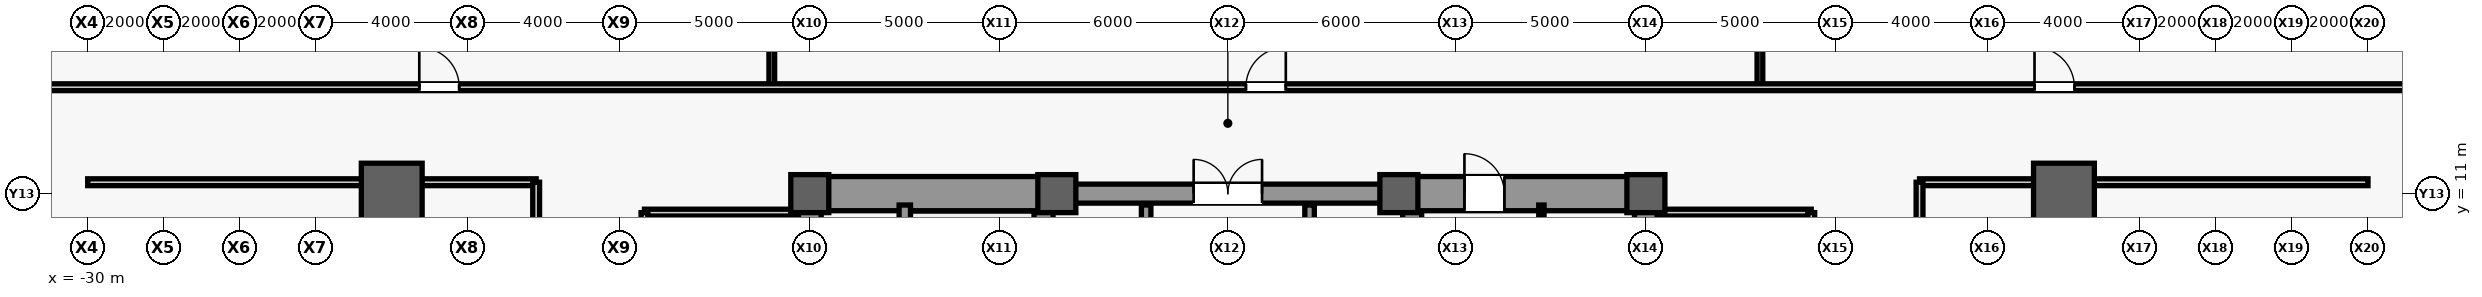
"""IFC4 building model, lengths in metres.
Left out: names, types, materials, properties, quantities, classifications, styles, units other than length and angle.
Written with IfcOpenShell. Run it as: python <this file> out.ifc"""

import sys

from ifc_helpers import new_model, si_unit, direction, frame, frame_2d, origin, origin_2d, place, context, subcontext, project, spatial, rectangle, extrude, source, transform, mapped, element, fill, save


model = new_model("IFC4")
c1 = context("Model", 3, precision=1e-05, world=origin(), true_north=direction((0.0, 1.0)))
c2 = subcontext(c1, "Body", "Model", "MODEL_VIEW")
j1 = project(units=[si_unit("LENGTHUNIT", "METRE"), si_unit("PLANEANGLEUNIT", "RADIAN")], contexts=[c1])
p1 = place(None, origin())
s1 = spatial("IfcSite", under=j1, at=p1, CompositionType="ELEMENT")
p2 = place(p1, origin())
s2 = spatial("IfcBuilding", under=s1, at=p2, CompositionType="ELEMENT")
p3 = place(p2, frame((0.0, 0.0, 6.6)))
s3 = spatial("IfcBuildingStorey", under=s2, at=p3, CompositionType="ELEMENT", Elevation=6.6)
m1 = source(origin(), c2, "Body", "SweptSolid", [
    extrude(rectangle(XDim=22.0, YDim=0.6, at=frame_2d((11.0, 0.0))), origin(), (0.0, 0.0, 1.0), 5.08),
])
p4 = place(p3, frame((-11.0, -11.0, 0.0), z_axis=(0.0, 0.0, 1.0), x_axis=(0.0, 1.0, 0.0)))
e1 = element("IfcWall", 1, at=p4, inside=s3, PredefinedType="SHEAR", context=c2, shape_type="MappedRepresentation", body=[
    mapped(m1, transform((0.0, 0.0, 0.0), scale=1.0)),
])
m2 = source(origin(), c2, "Body", "SweptSolid", [
    extrude(rectangle(XDim=1.1, YDim=2.2, at=frame_2d((0.55, 1.1))), frame((0.0, 0.31, 0.0), z_axis=(0.0, -1.0, 0.0), x_axis=(1.0, 0.0, 0.0)), (0.0, 0.0, 1.0), 0.62),
])
p5 = place(p4, frame((0.8, 0.0, 0.0)))
e2 = element("IfcOpeningElement", 2, at=p5, cuts=e1, PredefinedType="OPENING", context=c2, shape_type="MappedRepresentation", body=[
    mapped(m2, transform((0.0, 0.0, 0.0), scale=1.0)),
])
p6 = place(p4, frame((12.5, 0.0, 0.0)))
e3 = element("IfcOpeningElement", 3, at=p6, cuts=e1, PredefinedType="OPENING", context=c2, shape_type="MappedRepresentation", body=[
    mapped(m2, transform((0.0, 0.0, 0.0), scale=1.0)),
])
m3 = source(origin(), c2, "Body", "SweptSolid", [
    extrude(rectangle(XDim=0.9, YDim=2.15, at=frame_2d((0.45, 1.075))), frame((0.0, 0.31, 0.0), z_axis=(0.0, -1.0, 0.0), x_axis=(1.0, 0.0, 0.0)), (0.0, 0.0, 1.0), 0.62),
])
p7 = place(p4, frame((6.85, 0.0, 0.0)))
e4 = element("IfcOpeningElement", 4, at=p7, cuts=e1, PredefinedType="OPENING", context=c2, shape_type="MappedRepresentation", body=[
    mapped(m3, transform((0.0, 0.0, 0.0), scale=1.0)),
])
m4 = source(origin(), c2, "Body", "SweptSolid", [
    extrude(rectangle(XDim=1.3, YDim=2.3, at=frame_2d((0.65, 1.15))), frame((0.0, 0.31, 0.0), z_axis=(0.0, -1.0, 0.0), x_axis=(1.0, 0.0, 0.0)), (0.0, 0.0, 1.0), 0.62),
])
p8 = place(p4, frame((2.7, 0.0, 0.0)))
e5 = element("IfcOpeningElement", 5, at=p8, cuts=e1, PredefinedType="OPENING", context=c2, shape_type="MappedRepresentation", body=[
    mapped(m4, transform((0.0, 0.0, 0.0), scale=1.0)),
])
p9 = place(p3, frame((11.0, -11.0, 0.0), z_axis=(0.0, 0.0, 1.0), x_axis=(0.0, 1.0, 0.0)))
e6 = element("IfcWall", 6, at=p9, inside=s3, PredefinedType="SHEAR", context=c2, shape_type="MappedRepresentation", body=[
    mapped(m1, transform((0.0, 0.0, 0.0), scale=1.0)),
])
p10 = place(p9, frame((0.8, 0.0, 0.0)))
e7 = element("IfcOpeningElement", 7, at=p10, cuts=e6, PredefinedType="OPENING", context=c2, shape_type="MappedRepresentation", body=[
    mapped(m2, transform((0.0, 0.0, 0.0), scale=1.0)),
])
p11 = place(p9, frame((6.2, 0.0, 0.0)))
e8 = element("IfcOpeningElement", 8, at=p11, cuts=e6, PredefinedType="OPENING", context=c2, shape_type="MappedRepresentation", body=[
    mapped(m3, transform((0.0, 0.0, 0.0), scale=1.0)),
])
p12 = place(p9, frame((8.05, 0.0, 0.0)))
e9 = element("IfcOpeningElement", 9, at=p12, cuts=e6, PredefinedType="OPENING", context=c2, shape_type="MappedRepresentation", body=[
    mapped(m3, transform((0.0, 0.0, 0.0), scale=1.0)),
])
p13 = place(p9, frame((2.7, 0.0, 0.0)))
e10 = element("IfcOpeningElement", 10, at=p13, cuts=e6, PredefinedType="OPENING", context=c2, shape_type="MappedRepresentation", body=[
    mapped(m4, transform((0.0, 0.0, 0.0), scale=1.0)),
])
p14 = place(p9, frame((13.35, 0.0, 0.0)))
e11 = element("IfcOpeningElement", 11, at=p14, cuts=e6, PredefinedType="OPENING", context=c2, shape_type="MappedRepresentation", body=[
    mapped(m4, transform((0.0, 0.0, 0.0), scale=1.0)),
])
m5 = source(origin(), c2, "Body", "SweptSolid", [
    extrude(rectangle(XDim=21.4, YDim=0.5, at=frame_2d((10.7, 0.0))), origin(), (0.0, 0.0, 1.0), 5.08),
])
for number, where, z_axis, x_axis in (
    (12, (-4.85, -10.7, 0.0), (0.0, 0.0, 1.0), (0.0, 1.0, 0.0)),
    (13, (4.85, -10.7, 0.0), (0.0, 0.0, 1.0), (0.0, 1.0, 0.0)),
):
    element("IfcWall", number, at=place(p3, frame(where, z_axis=z_axis, x_axis=x_axis)), inside=s3, PredefinedType="SHEAR", context=c2, shape_type="MappedRepresentation", body=[
        mapped(m5, transform((0.0, 0.0, 0.0), scale=1.0)),
    ])
m6 = source(origin(), c2, "Body", "SweptSolid", [
    extrude(rectangle(XDim=5.85, YDim=0.9, at=frame_2d((2.925, 0.0))), origin(), (0.0, 0.0, 1.0), 5.08),
])
p15 = place(p3, frame((-10.7, 11.0, 0.0), z_axis=(0.0, 0.0, 1.0), x_axis=(1.0, 0.0, 0.0)))
e14 = element("IfcWall", 14, at=p15, inside=s3, PredefinedType="SHEAR", context=c2, shape_type="MappedRepresentation", body=[
    mapped(m6, transform((0.0, 0.0, 0.0), scale=1.0)),
])
p16 = place(p3, frame((4.85, 11.0, 0.0), z_axis=(0.0, 0.0, 1.0), x_axis=(1.0, 0.0, 0.0)))
e15 = element("IfcWall", 15, at=p16, inside=s3, PredefinedType="SHEAR", context=c2, shape_type="MappedRepresentation", body=[
    mapped(m6, transform((0.0, 0.0, 0.0), scale=1.0)),
])
m7 = source(origin(), c2, "Body", "SweptSolid", [
    extrude(rectangle(XDim=1.05, YDim=2.2, at=frame_2d((0.525, 1.1))), frame((0.0, 0.46, 0.0), z_axis=(0.0, -1.0, 0.0), x_axis=(1.0, 0.0, 0.0)), (0.0, 0.0, 1.0), 0.92),
])
p17 = place(p16, frame((1.375, 0.0, 0.0)))
e16 = element("IfcOpeningElement", 16, at=p17, cuts=e15, PredefinedType="OPENING", context=c2, shape_type="MappedRepresentation", body=[
    mapped(m7, transform((0.0, 0.0, 0.0), scale=1.0)),
])
m8 = source(origin(), c2, "Body", "SweptSolid", [
    extrude(rectangle(XDim=9.2, YDim=0.5, at=frame_2d((4.6, 0.0))), origin(), (0.0, 0.0, 1.0), 5.08),
])
p18 = place(p3, frame((-4.6, 11.0, 0.0), z_axis=(0.0, 0.0, 1.0), x_axis=(1.0, 0.0, 0.0)))
e17 = element("IfcWall", 17, at=p18, inside=s3, PredefinedType="SHEAR", context=c2, shape_type="MappedRepresentation", body=[
    mapped(m8, transform((0.0, 0.0, 0.0), scale=1.0)),
])
m9 = source(origin(), c2, "Body", "SweptSolid", [
    extrude(rectangle(XDim=1.8, YDim=2.25, at=frame_2d((0.9, 1.125))), frame((0.0, 0.26, 0.0), z_axis=(0.0, -1.0, 0.0), x_axis=(1.0, 0.0, 0.0)), (0.0, 0.0, 1.0), 0.52),
])
p19 = place(p18, frame((3.7, 0.0, 0.0)))
e18 = element("IfcOpeningElement", 18, at=p19, cuts=e17, PredefinedType="OPENING", context=c2, shape_type="MappedRepresentation", body=[
    mapped(m9, transform((0.0, 0.0, 0.0), scale=1.0)),
])
m10 = source(origin(), c2, "Body", "SweptSolid", [
    extrude(rectangle(XDim=1.6, YDim=1.6, at=origin_2d()), origin(), (0.0, 0.0, 1.0), 5.4),
])
p20 = place(p3, frame((-22.0, 11.0, 0.0), z_axis=(0.0, 0.0, 1.0), x_axis=(1.0, 0.0, 0.0)))
e19 = element("IfcColumn", 19, at=p20, inside=s3, PredefinedType="COLUMN", context=c2, shape_type="MappedRepresentation", body=[
    mapped(m10, transform((0.0, 0.0, 0.0), scale=1.0)),
])
m11 = source(origin(), c2, "Body", "SweptSolid", [
    extrude(rectangle(XDim=1.0, YDim=1.0, at=origin_2d()), origin(), (0.0, 0.0, 1.0), 5.4),
])
for number, where, z_axis, x_axis in (
    (20, (-11.0, 11.0, 0.0), (0.0, 0.0, 1.0), (1.0, 0.0, 0.0)),
    (21, (-4.5, 11.0, 0.0), (0.0, 0.0, 1.0), (1.0, 0.0, 0.0)),
    (22, (4.5, 11.0, 0.0), (0.0, 0.0, 1.0), (1.0, 0.0, 0.0)),
    (23, (11.0, 11.0, 0.0), (0.0, 0.0, 1.0), (1.0, 0.0, 0.0)),
):
    element("IfcColumn", number, at=place(p3, frame(where, z_axis=z_axis, x_axis=x_axis)), inside=s3, PredefinedType="COLUMN", context=c2, shape_type="MappedRepresentation", body=[
        mapped(m11, transform((0.0, 0.0, 0.0), scale=1.0)),
    ])
p21 = place(p3, frame((22.0, 11.0, 0.0), z_axis=(0.0, 0.0, 1.0), x_axis=(1.0, 0.0, 0.0)))
e24 = element("IfcColumn", 24, at=p21, inside=s3, PredefinedType="COLUMN", context=c2, shape_type="MappedRepresentation", body=[
    mapped(m10, transform((0.0, 0.0, 0.0), scale=1.0)),
])
m12 = source(origin(), c2, "Body", "SweptSolid", [
    extrude(rectangle(XDim=7.75, YDim=0.3, at=frame_2d((3.875, 0.0))), origin(), (0.0, 0.0, 1.0), 5.08),
])
p22 = place(p3, frame((-8.5, 2.95, 0.0), z_axis=(0.0, 0.0, 1.0), x_axis=(0.0, 1.0, 0.0)))
e25 = element("IfcWall", 25, at=p22, inside=s3, PredefinedType="SHEAR", context=c2, shape_type="MappedRepresentation", body=[
    mapped(m12, transform((0.0, 0.0, 0.0), scale=1.0)),
])
m13 = source(origin(), c2, "Body", "SweptSolid", [
    extrude(rectangle(XDim=9.4, YDim=0.14, at=frame_2d((4.7, 0.0))), origin(), (0.0, 0.0, 1.0), 5.08),
])
p23 = place(p3, frame((8.25, 1.3, 0.0), z_axis=(0.0, 0.0, 1.0), x_axis=(0.0, 1.0, 0.0)))
e26 = element("IfcWall", 26, at=p23, inside=s3, PredefinedType="PARTITIONING", context=c2, shape_type="MappedRepresentation", body=[
    mapped(m13, transform((0.0, 0.0, 0.0), scale=1.0)),
])
m14 = source(origin(), c2, "Body", "SweptSolid", [
    extrude(rectangle(XDim=4.05, YDim=0.18, at=frame_2d((2.025, 0.0))), origin(), (0.0, 0.0, 1.0), 5.08),
])
p24 = place(p3, frame((-15.35, 10.5, 0.0), z_axis=(0.0, 0.0, 1.0), x_axis=(1.0, 0.0, 0.0)))
e27 = element("IfcWall", 27, at=p24, inside=s3, PredefinedType="PARTITIONING", context=c2, shape_type="MappedRepresentation", body=[
    mapped(m14, transform((0.0, 0.0, 0.0), scale=1.0)),
])
m15 = source(origin(), c2, "Body", "SweptSolid", [
    extrude(rectangle(XDim=16.6, YDim=0.18, at=frame_2d((8.3, 0.0))), origin(), (0.0, 0.0, 1.0), 5.08),
])
p25 = place(p3, frame((-15.35, -6.1, 0.0), z_axis=(0.0, 0.0, 1.0), x_axis=(0.0, 1.0, 0.0)))
e28 = element("IfcWall", 28, at=p25, inside=s3, PredefinedType="PARTITIONING", context=c2, shape_type="MappedRepresentation", body=[
    mapped(m15, transform((0.0, 0.0, 0.0), scale=1.0)),
])
m16 = source(origin(), c2, "Body", "SweptSolid", [
    extrude(rectangle(XDim=1.8, YDim=2.25, at=frame_2d((0.9, 1.125))), frame((0.0, 0.1, 0.0), z_axis=(0.0, -1.0, 0.0), x_axis=(1.0, 0.0, 0.0)), (0.0, 0.0, 1.0), 0.2),
])
p26 = place(p25, frame((2.7, 0.0, 0.0)))
e29 = element("IfcOpeningElement", 29, at=p26, cuts=e28, PredefinedType="OPENING", context=c2, shape_type="MappedRepresentation", body=[
    mapped(m16, transform((0.0, 0.0, 0.0), scale=1.0)),
])
p27 = place(p25, frame((11.0, 0.0, 0.0)))
e30 = element("IfcOpeningElement", 30, at=p27, cuts=e28, PredefinedType="OPENING", context=c2, shape_type="MappedRepresentation", body=[
    mapped(m16, transform((0.0, 0.0, 0.0), scale=1.0)),
])
p28 = place(p3, frame((11.3, 10.5, 0.0), z_axis=(0.0, 0.0, 1.0), x_axis=(1.0, 0.0, 0.0)))
e31 = element("IfcWall", 31, at=p28, inside=s3, PredefinedType="PARTITIONING", context=c2, shape_type="MappedRepresentation", body=[
    mapped(m14, transform((0.0, 0.0, 0.0), scale=1.0)),
])
p29 = place(p3, frame((15.35, -6.1, 0.0), z_axis=(0.0, 0.0, 1.0), x_axis=(0.0, 1.0, 0.0)))
e32 = element("IfcWall", 32, at=p29, inside=s3, PredefinedType="PARTITIONING", context=c2, shape_type="MappedRepresentation", body=[
    mapped(m15, transform((0.0, 0.0, 0.0), scale=1.0)),
])
p30 = place(p29, frame((2.7, 0.0, 0.0)))
e33 = element("IfcOpeningElement", 33, at=p30, cuts=e32, PredefinedType="OPENING", context=c2, shape_type="MappedRepresentation", body=[
    mapped(m16, transform((0.0, 0.0, 0.0), scale=1.0)),
])
p31 = place(p29, frame((13.0, 0.0, 0.0)))
e34 = element("IfcOpeningElement", 34, at=p31, cuts=e32, PredefinedType="OPENING", context=c2, shape_type="MappedRepresentation", body=[
    mapped(m16, transform((0.0, 0.0, 0.0), scale=1.0)),
])
m17 = source(origin(), c2, "Body", "SweptSolid", [
    extrude(rectangle(XDim=5.4, YDim=0.25, at=frame_2d((2.7, 0.0))), origin(), (0.0, 0.0, 1.0), 5.08),
])
for number, where, z_axis, x_axis in (
    (35, (-2.15, 5.3, 0.0), (0.0, 0.0, 1.0), (0.0, 1.0, 0.0)),
    (36, (2.15, 5.3, 0.0), (0.0, 0.0, 1.0), (0.0, 1.0, 0.0)),
):
    element("IfcWall", number, at=place(p3, frame(where, z_axis=z_axis, x_axis=x_axis)), inside=s3, PredefinedType="SHEAR", context=c2, shape_type="MappedRepresentation", body=[
        mapped(m17, transform((0.0, 0.0, 0.0), scale=1.0)),
    ])
m18 = source(origin(), c2, "Body", "SweptSolid", [
    extrude(rectangle(XDim=23.2, YDim=0.15, at=frame_2d((11.6, 0.0))), origin(), (0.0, 0.0, 1.0), 5.08),
])
for number, where, z_axis, x_axis in (
    (37, (-12.0, 13.8, 0.0), (0.0, 0.0, 1.0), (0.0, 1.0, 0.0)),
    (38, (14.0, 13.8, 0.0), (0.0, 0.0, 1.0), (0.0, 1.0, 0.0)),
):
    element("IfcWall", number, at=place(p3, frame(where, z_axis=z_axis, x_axis=x_axis)), inside=s3, PredefinedType="PARTITIONING", context=c2, shape_type="MappedRepresentation", body=[
        mapped(m18, transform((0.0, 0.0, 0.0), scale=1.0)),
    ])
m19 = source(origin(), c2, "Body", "SweptSolid", [
    extrude(rectangle(XDim=88.0, YDim=0.18, at=frame_2d((44.0, 0.0))), origin(), (0.0, 0.0, 1.0), 5.08),
])
p32 = place(p3, frame((-44.0, 13.8, 0.0), z_axis=(0.0, 0.0, 1.0), x_axis=(1.0, 0.0, 0.0)))
e39 = element("IfcWall", 39, at=p32, inside=s3, PredefinedType="PARTITIONING", context=c2, shape_type="MappedRepresentation", body=[
    mapped(m19, transform((0.0, 0.0, 0.0), scale=1.0)),
])
m20 = source(origin(), c2, "Body", "SweptSolid", [
    extrude(rectangle(XDim=1.05, YDim=2.2, at=frame_2d((0.525, 1.1))), frame((0.0, 0.1, 0.0), z_axis=(0.0, -1.0, 0.0), x_axis=(1.0, 0.0, 0.0)), (0.0, 0.0, 1.0), 0.2),
])
p33 = place(p32, frame((22.725, 0.0, 0.0)))
e40 = element("IfcOpeningElement", 40, at=p33, cuts=e39, PredefinedType="OPENING", context=c2, shape_type="MappedRepresentation", body=[
    mapped(m20, transform((0.0, 0.0, 0.0), scale=1.0)),
])
p34 = place(p32, frame((44.475, 0.0, 0.0)))
e41 = element("IfcOpeningElement", 41, at=p34, cuts=e39, PredefinedType="OPENING", context=c2, shape_type="MappedRepresentation", body=[
    mapped(m20, transform((0.0, 0.0, 0.0), scale=1.0)),
])
p35 = place(p32, frame((65.225, 0.0, 0.0)))
e42 = element("IfcOpeningElement", 42, at=p35, cuts=e39, PredefinedType="OPENING", context=c2, shape_type="MappedRepresentation", body=[
    mapped(m20, transform((0.0, 0.0, 0.0), scale=1.0)),
])
m21 = source(origin(), c2, "Body", "SweptSolid", [
    extrude(rectangle(XDim=11.8, YDim=0.18, at=frame_2d((5.9, 0.0))), origin(), (0.0, 0.0, 1.0), 3.28),
])
for number, where, z_axis, x_axis in (
    (43, (-30.0, 11.3, 0.0), (0.0, 0.0, 1.0), (1.0, 0.0, 0.0)),
    (44, (18.2, 11.3, 0.0), (0.0, 0.0, 1.0), (1.0, 0.0, 0.0)),
):
    element("IfcWall", number, at=place(p3, frame(where, z_axis=z_axis, x_axis=x_axis)), inside=s3, PredefinedType="PARTITIONING", context=c2, shape_type="MappedRepresentation", body=[
        mapped(m21, transform((0.0, 0.0, 0.0), scale=1.0)),
    ])
m22 = source(origin(), c2, "Body", "SweptSolid", [
    extrude(rectangle(XDim=24.3, YDim=0.18, at=frame_2d((12.15, 0.0))), origin(), (0.0, 0.0, 1.0), 5.08),
])
p36 = place(p3, frame((-18.2, -13.0, 0.0), z_axis=(0.0, 0.0, 1.0), x_axis=(0.0, 1.0, 0.0)))
e45 = element("IfcWall", 45, at=p36, inside=s3, PredefinedType="PARTITIONING", context=c2, shape_type="MappedRepresentation", body=[
    mapped(m22, transform((0.0, 0.0, 0.0), scale=1.0)),
])
m23 = source(origin(), c2, "Body", "SweptSolid", [
    extrude(rectangle(XDim=0.95, YDim=2.15, at=frame_2d((0.475, 1.075))), frame((0.0, 0.1, 0.0), z_axis=(0.0, -1.0, 0.0), x_axis=(1.0, 0.0, 0.0)), (0.0, 0.0, 1.0), 0.2),
])
p37 = place(p36, frame((6.025, 0.0, 0.0)))
e46 = element("IfcOpeningElement", 46, at=p37, cuts=e45, PredefinedType="OPENING", context=c2, shape_type="MappedRepresentation", body=[
    mapped(m23, transform((0.0, 0.0, 0.0), scale=1.0)),
])
p38 = place(p36, frame((18.175, 0.0, 0.0)))
e47 = element("IfcOpeningElement", 47, at=p38, cuts=e45, PredefinedType="OPENING", context=c2, shape_type="MappedRepresentation", body=[
    mapped(m23, transform((0.0, 0.0, 0.0), scale=1.0)),
])
p39 = place(p3, frame((18.2, -13.0, 0.0), z_axis=(0.0, 0.0, 1.0), x_axis=(0.0, 1.0, 0.0)))
e48 = element("IfcWall", 48, at=p39, inside=s3, PredefinedType="PARTITIONING", context=c2, shape_type="MappedRepresentation", body=[
    mapped(m22, transform((0.0, 0.0, 0.0), scale=1.0)),
])
p40 = place(p39, frame((6.025, 0.0, 0.0)))
e49 = element("IfcOpeningElement", 49, at=p40, cuts=e48, PredefinedType="OPENING", context=c2, shape_type="MappedRepresentation", body=[
    mapped(m23, transform((0.0, 0.0, 0.0), scale=1.0)),
])
p41 = place(p39, frame((18.175, 0.0, 0.0)))
e50 = element("IfcOpeningElement", 50, at=p41, cuts=e48, PredefinedType="OPENING", context=c2, shape_type="MappedRepresentation", body=[
    mapped(m23, transform((0.0, 0.0, 0.0), scale=1.0)),
])
m24 = source(origin(), c2, "Body", "SweptSolid", [
    extrude(rectangle(XDim=1.05, YDim=2.2, at=frame_2d((0.525, 1.1))), frame((0.0, 0.025, 0.0), z_axis=(0.0, -1.0, 0.0), x_axis=(1.0, 0.0, 0.0)), (0.0, 0.0, 1.0), 0.05),
])
p42 = place(p17, origin())
e51 = element("IfcDoor", 51, at=p42, inside=s3, OperationType="SINGLE_SWING_LEFT", PredefinedType="DOOR", context=c2, shape_type="MappedRepresentation", body=[
    mapped(m24, transform((0.0, 0.0, 0.0), scale=1.0)),
])
fill(e16, e51)
m25 = source(origin(), c2, "Body", "SweptSolid", [
    extrude(rectangle(XDim=1.8, YDim=2.25, at=frame_2d((0.9, 1.125))), frame((0.0, 0.025, 0.0), z_axis=(0.0, -1.0, 0.0), x_axis=(1.0, 0.0, 0.0)), (0.0, 0.0, 1.0), 0.05),
])
p43 = place(p19, origin())
e52 = element("IfcDoor", 52, at=p43, inside=s3, OperationType="SINGLE_SWING_RIGHT", PredefinedType="DOOR", context=c2, shape_type="MappedRepresentation", body=[
    mapped(m25, transform((0.0, 0.0, 0.0), scale=1.0)),
])
fill(e18, e52)
p44 = place(p33, origin())
e53 = element("IfcDoor", 53, at=p44, inside=s3, OperationType="SINGLE_SWING_LEFT", PredefinedType="DOOR", context=c2, shape_type="MappedRepresentation", body=[
    mapped(m24, transform((0.0, 0.0, 0.0), scale=1.0)),
])
fill(e40, e53)
p45 = place(p34, origin())
e54 = element("IfcDoor", 54, at=p45, inside=s3, OperationType="SINGLE_SWING_RIGHT", PredefinedType="DOOR", context=c2, shape_type="MappedRepresentation", body=[
    mapped(m24, transform((0.0, 0.0, 0.0), scale=1.0)),
])
fill(e41, e54)
p46 = place(p35, origin())
e55 = element("IfcDoor", 55, at=p46, inside=s3, OperationType="SINGLE_SWING_LEFT", PredefinedType="DOOR", context=c2, shape_type="MappedRepresentation", body=[
    mapped(m24, transform((0.0, 0.0, 0.0), scale=1.0)),
])
fill(e42, e55)
save(model, sys.argv[1])
